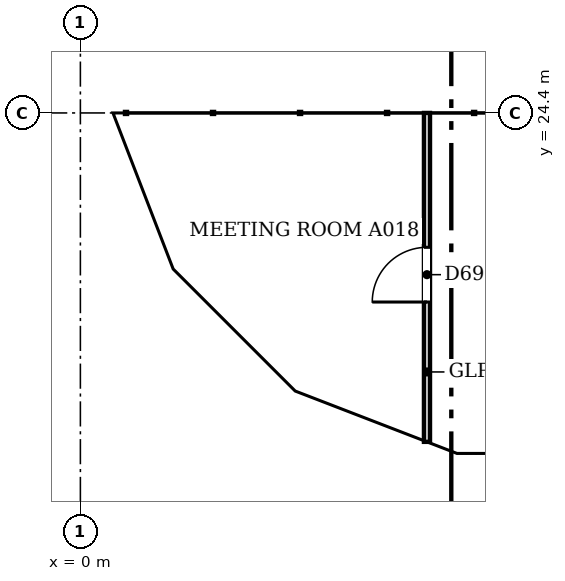
"""IFC4 building model, lengths in metres.
Left out: names, types, materials, properties, quantities, classifications, styles, units other than length and angle.
Written with IfcOpenShell. Run it as: python <this file> out.ifc"""

import sys

from ifc_helpers import new_model, si_unit, direction, frame, frame_2d, origin, place, context, subcontext, project, spatial, polyline, rectangle, outline, extrude, faceted_brep, source, transform, mapped, element, fill, save


model = new_model("IFC4")
c1 = context("Model", 3, precision=1e-05, world=origin(), true_north=direction((0.0, 1.0)))
c2 = subcontext(c1, "Body", "Model", "MODEL_VIEW")
j1 = project(units=[si_unit("LENGTHUNIT", "METRE"), si_unit("PLANEANGLEUNIT", "RADIAN")], contexts=[c1])
p1 = place(None, origin())
s1 = spatial("IfcSite", under=j1, at=p1, CompositionType="ELEMENT")
p2 = place(p1, origin())
s2 = spatial("IfcBuilding", under=s1, at=p2, CompositionType="ELEMENT")
p3 = place(p2, frame((0.0, 0.0, 37.2)))
s3 = spatial("IfcBuildingStorey", under=s2, at=p3, CompositionType="ELEMENT", Elevation=37.2)
m1 = source(origin(), c2, "Body", "Brep", [
    faceted_brep([(3.003, -0.25, 0.0), (3.05, -0.25, 0.06), (3.05, -0.25, 7.54), (3.003, -0.25, 7.6), (0.0, -0.25, 3.8), (0.0, 0.25, 3.8), (2.957, 0.25, 7.541), (2.957, 0.25, 0.059), (3.003, 0.0, 0.0), (3.003, 0.0, 7.6)], [[[0, 1, 2, 3, 4]], [[5, 6, 7]], [[1, 0, 8]], [[9, 3, 2]], [[6, 5, 4, 3, 9]], [[5, 7, 8, 0, 4]], [[1, 8, 7, 6, 9, 2]]]),
])
p4 = place(p3, frame((0.25, 27.45, -3.8), z_axis=(0.0, 0.0, 1.0), x_axis=(0.0, -1.0, 0.0)))
e1 = element("IfcWall", 1, at=p4, inside=s3, PredefinedType="SOLIDWALL", context=c2, shape_type="MappedRepresentation", body=[
    mapped(m1, transform((0.0, 0.0, 0.0), scale=1.0)),
])
m2 = source(origin(), c2, "Body", "SweptSolid", [
    extrude(outline(polyline([(2.803, 6.944), (0.319, 3.8), (2.803, 0.656), (2.803, 6.944)])), frame((0.0, 0.26, 0.0), z_axis=(0.0, -1.0, 0.0), x_axis=(1.0, 0.0, 0.0)), (0.0, 0.0, 1.0), 0.52),
])
p5 = place(p4, origin())
e2 = element("IfcOpeningElement", 2, at=p5, cuts=e1, PredefinedType="OPENING", context=c2, shape_type="MappedRepresentation", body=[
    mapped(m2, transform((0.0, 0.0, 0.0), scale=1.0)),
])
m3 = source(origin(), c2, "Body", "Brep", [
    faceted_brep([(0.047, -0.25, 0.0), (2.997, -0.25, 3.8), (0.047, -0.25, 7.6), (0.0, -0.25, 7.541), (0.0, -0.25, 0.059), (0.093, 0.25, 7.54), (2.944, 0.25, 3.868), (2.944, 0.25, 3.732), (0.093, 0.25, 0.06), (2.997, 0.0, 3.8), (0.047, 0.0, 0.0), (0.047, 0.0, 7.6)], [[[0, 1, 2, 3, 4]], [[5, 6, 7, 8]], [[8, 7, 9, 1, 0, 10]], [[6, 5, 11, 2, 1, 9]], [[3, 2, 11]], [[10, 0, 4]], [[8, 10, 4, 3, 11, 5]], [[9, 7, 6]]]),
])
p6 = place(p3, frame((0.233, 24.49, -3.8), z_axis=(0.0, 0.0, 1.0), x_axis=(0.359901446078, -0.932990326376, 0.0)))
e3 = element("IfcWall", 3, at=p6, inside=s3, PredefinedType="SOLIDWALL", context=c2, shape_type="MappedRepresentation", body=[
    mapped(m3, transform((0.0, 0.0, 0.0), scale=1.0)),
])
m4 = source(origin(), c2, "Body", "SweptSolid", [
    extrude(outline(polyline([(0.247, 0.665), (2.681, 3.8), (0.247, 6.935), (0.247, 0.665)])), frame((0.0, 0.26, 0.0), z_axis=(0.0, -1.0, 0.0), x_axis=(1.0, 0.0, 0.0)), (0.0, 0.0, 1.0), 0.52),
])
p7 = place(p6, origin())
e4 = element("IfcOpeningElement", 4, at=p7, cuts=e3, PredefinedType="OPENING", context=c2, shape_type="MappedRepresentation", body=[
    mapped(m4, transform((0.0, 0.0, 0.0), scale=1.0)),
])
m5 = source(origin(), c2, "Body", "Brep", [
    faceted_brep([(2.944, -0.25, 0.0), (2.997, -0.25, 0.068), (2.997, -0.25, 7.532), (2.944, -0.25, 7.6), (0.0, -0.25, 3.8), (0.053, 0.25, 3.868), (2.891, 0.25, 7.532), (2.891, 0.25, 0.068), (0.053, 0.25, 3.732), (2.944, 0.0, 0.0), (2.944, 0.0, 7.6), (0.0, 0.0, 3.8)], [[[0, 1, 2, 3, 4]], [[5, 6, 7, 8]], [[1, 0, 9]], [[10, 3, 2]], [[6, 5, 11, 4, 3, 10]], [[8, 7, 9, 0, 4, 11]], [[8, 11, 5]], [[1, 9, 7, 6, 10, 2]]]),
])
p8 = place(p3, frame((1.312, 21.694, -3.8), z_axis=(0.0, 0.0, 1.0), x_axis=(0.707066050402, -0.707147509625, 0.0)))
e5 = element("IfcWall", 5, at=p8, inside=s3, PredefinedType="SOLIDWALL", context=c2, shape_type="MappedRepresentation", body=[
    mapped(m5, transform((0.0, 0.0, 0.0), scale=1.0)),
])
m6 = source(origin(), c2, "Body", "SweptSolid", [
    extrude(outline(polyline([(2.744, 6.934), (0.316, 3.8), (2.744, 0.667), (2.744, 6.934)])), frame((0.0, 0.26, 0.0), z_axis=(0.0, -1.0, 0.0), x_axis=(1.0, 0.0, 0.0)), (0.0, 0.0, 1.0), 0.52),
])
p9 = place(p8, origin())
e6 = element("IfcOpeningElement", 6, at=p9, cuts=e5, PredefinedType="OPENING", context=c2, shape_type="MappedRepresentation", body=[
    mapped(m6, transform((0.0, 0.0, 0.0), scale=1.0)),
])
m7 = source(origin(), c2, "Body", "Brep", [
    faceted_brep([(0.053, -0.25, 0.0), (3.003, -0.25, 3.8), (0.053, -0.25, 7.6), (0.0, -0.25, 7.532), (0.0, -0.25, 0.068), (0.106, 0.25, 7.532), (2.957, 0.25, 3.86), (2.957, 0.25, 3.74), (0.106, 0.25, 0.068), (3.003, 0.0, 3.8), (0.053, 0.0, 0.0), (0.053, 0.0, 7.6)], [[[0, 1, 2, 3, 4]], [[5, 6, 7, 8]], [[8, 7, 9, 1, 0, 10]], [[6, 5, 11, 2, 1, 9]], [[3, 2, 11]], [[10, 0, 4]], [[8, 10, 4, 3, 11, 5]], [[9, 7, 6]]]),
])
p10 = place(p3, frame((3.344, 19.631, -3.8), z_axis=(0.0, 0.0, 1.0), x_axis=(0.933007896601, -0.359855894603, 0.0)))
e7 = element("IfcWall", 7, at=p10, inside=s3, PredefinedType="SOLIDWALL", context=c2, shape_type="MappedRepresentation", body=[
    mapped(m7, transform((0.0, 0.0, 0.0), scale=1.0)),
])
m8 = source(origin(), c2, "Body", "SweptSolid", [
    extrude(outline(polyline([(0.253, 0.665), (2.687, 3.8), (0.253, 6.935), (0.253, 0.665)])), frame((0.0, 0.26, 0.0), z_axis=(0.0, -1.0, 0.0), x_axis=(1.0, 0.0, 0.0)), (0.0, 0.0, 1.0), 0.52),
])
p11 = place(p10, origin())
e8 = element("IfcOpeningElement", 8, at=p11, cuts=e7, PredefinedType="OPENING", context=c2, shape_type="MappedRepresentation", body=[
    mapped(m8, transform((0.0, 0.0, 0.0), scale=1.0)),
])
m9 = source(origin(), c2, "Body", "Brep", [
    faceted_brep([(3.003, -0.25, 0.0), (6.053, -0.25, 3.8), (3.003, -0.25, 7.6), (0.0, -0.25, 3.8), (0.047, 0.25, 3.859), (3.003, 0.25, 7.6), (6.053, 0.25, 3.8), (3.003, 0.25, 0.0), (0.047, 0.25, 3.741), (0.0, 0.0, 3.8)], [[[0, 1, 2, 3]], [[4, 5, 6, 7, 8]], [[7, 6, 1, 0]], [[6, 5, 2, 1]], [[5, 4, 9, 3, 2]], [[8, 7, 0, 3, 9]], [[8, 9, 4]]]),
])
p12 = place(p3, frame((6.146, 18.55, -3.8), z_axis=(0.0, 0.0, 1.0), x_axis=(1.0, 0.0, 0.0)))
e9 = element("IfcWall", 9, at=p12, inside=s3, PredefinedType="SOLIDWALL", context=c2, shape_type="MappedRepresentation", body=[
    mapped(m9, transform((0.0, 0.0, 0.0), scale=1.0)),
])
m10 = source(origin(), c2, "Body", "SweptSolid", [
    extrude(outline(polyline([(3.005, 0.401), (5.733, 3.8), (3.005, 7.199), (0.319, 3.8), (3.005, 0.401)])), frame((0.0, 0.26, 0.0), z_axis=(0.0, -1.0, 0.0), x_axis=(1.0, 0.0, 0.0)), (0.0, 0.0, 1.0), 0.52),
])
p13 = place(p12, origin())
e10 = element("IfcOpeningElement", 10, at=p13, cuts=e9, PredefinedType="OPENING", context=c2, shape_type="MappedRepresentation", body=[
    mapped(m10, transform((0.0, 0.0, 0.0), scale=1.0)),
])
p14 = place(p2, frame((0.0, 0.0, 41.0)))
s4 = spatial("IfcBuildingStorey", under=s2, at=p14, CompositionType="ELEMENT", Elevation=41.0)
m11 = source(origin(), c2, "Body", "Brep", [
    faceted_brep([(3.05, -0.25, 0.0), (6.053, -0.25, 3.8), (3.05, -0.25, 7.6), (0.0, -0.25, 3.8), (0.0, 0.25, 3.8), (3.05, 0.25, 7.6), (6.007, 0.25, 3.859), (6.007, 0.25, 3.741), (3.05, 0.25, 0.0), (6.053, 0.0, 3.8)], [[[0, 1, 2, 3]], [[4, 5, 6, 7, 8]], [[8, 7, 9, 1, 0]], [[6, 5, 2, 1, 9]], [[5, 4, 3, 2]], [[4, 8, 0, 3]], [[9, 7, 6]]]),
])
p15 = place(p14, frame((0.25, 30.5, -3.8), z_axis=(0.0, 0.0, 1.0), x_axis=(0.0, -1.0, 0.0)))
e11 = element("IfcWall", 11, at=p15, inside=s4, PredefinedType="SOLIDWALL", context=c2, shape_type="MappedRepresentation", body=[
    mapped(m11, transform((0.0, 0.0, 0.0), scale=1.0)),
])
m12 = source(origin(), c2, "Body", "SweptSolid", [
    extrude(outline(polyline([(3.049, 0.401), (5.735, 3.8), (3.049, 7.199), (0.321, 3.8), (3.049, 0.401)])), frame((0.0, 0.26, 0.0), z_axis=(0.0, -1.0, 0.0), x_axis=(1.0, 0.0, 0.0)), (0.0, 0.0, 1.0), 0.52),
])
p16 = place(p15, origin())
e12 = element("IfcOpeningElement", 12, at=p16, cuts=e11, PredefinedType="OPENING", context=c2, shape_type="MappedRepresentation", body=[
    mapped(m12, transform((0.0, 0.0, 0.0), scale=1.0)),
])
m13 = source(origin(), c2, "Body", "Brep", [
    faceted_brep([(2.95, -0.25, 0.0), (3.003, -0.25, 0.068), (3.003, -0.25, 7.532), (2.95, -0.25, 7.6), (0.0, -0.25, 3.8), (0.047, 0.25, 3.86), (2.898, 0.25, 7.532), (2.898, 0.25, 0.068), (0.047, 0.25, 3.74), (2.95, 0.0, 0.0), (2.95, 0.0, 7.6), (0.0, 0.0, 3.8)], [[[0, 1, 2, 3, 4]], [[5, 6, 7, 8]], [[1, 0, 9]], [[10, 3, 2]], [[6, 5, 11, 4, 3, 10]], [[8, 7, 9, 0, 4, 11]], [[8, 11, 5]], [[1, 9, 7, 6, 10, 2]]]),
])
p17 = place(p14, frame((0.25, 24.447, -3.8), z_axis=(0.0, 0.0, 1.0), x_axis=(0.35992665181, -0.932980602862, 0.0)))
e13 = element("IfcWall", 13, at=p17, inside=s4, PredefinedType="SOLIDWALL", context=c2, shape_type="MappedRepresentation", body=[
    mapped(m13, transform((0.0, 0.0, 0.0), scale=1.0)),
])
m14 = source(origin(), c2, "Body", "SweptSolid", [
    extrude(outline(polyline([(2.75, 6.935), (0.316, 3.8), (2.75, 0.665), (2.75, 6.935)])), frame((0.0, 0.26, 0.0), z_axis=(0.0, -1.0, 0.0), x_axis=(1.0, 0.0, 0.0)), (0.0, 0.0, 1.0), 0.52),
])
p18 = place(p17, origin())
e14 = element("IfcOpeningElement", 14, at=p18, cuts=e13, PredefinedType="OPENING", context=c2, shape_type="MappedRepresentation", body=[
    mapped(m14, transform((0.0, 0.0, 0.0), scale=1.0)),
])
m15 = source(origin(), c2, "Body", "Brep", [
    faceted_brep([(0.053, -0.25, 0.0), (2.997, -0.25, 3.8), (0.053, -0.25, 7.6), (0.0, -0.25, 7.532), (0.0, -0.25, 0.068), (0.106, 0.25, 7.532), (2.944, 0.25, 3.868), (2.944, 0.25, 3.732), (0.106, 0.25, 0.068), (2.997, 0.0, 3.8), (0.053, 0.0, 0.0), (0.053, 0.0, 7.6)], [[[0, 1, 2, 3, 4]], [[5, 6, 7, 8]], [[8, 7, 9, 1, 0, 10]], [[6, 5, 11, 2, 1, 9]], [[3, 2, 11]], [[10, 0, 4]], [[8, 10, 4, 3, 11, 5]], [[9, 7, 6]]]),
])
p19 = place(p14, frame((1.274, 21.731, -3.8), z_axis=(0.0, 0.0, 1.0), x_axis=(0.707147509625, -0.707066050402, 0.0)))
e15 = element("IfcWall", 15, at=p19, inside=s4, PredefinedType="SOLIDWALL", context=c2, shape_type="MappedRepresentation", body=[
    mapped(m15, transform((0.0, 0.0, 0.0), scale=1.0)),
])
m16 = source(origin(), c2, "Body", "SweptSolid", [
    extrude(outline(polyline([(0.253, 0.666), (2.681, 3.8), (0.253, 6.934), (0.253, 0.666)])), frame((0.0, 0.26, 0.0), z_axis=(0.0, -1.0, 0.0), x_axis=(1.0, 0.0, 0.0)), (0.0, 0.0, 1.0), 0.52),
])
p20 = place(p19, origin())
e16 = element("IfcOpeningElement", 16, at=p20, cuts=e15, PredefinedType="OPENING", context=c2, shape_type="MappedRepresentation", body=[
    mapped(m16, transform((0.0, 0.0, 0.0), scale=1.0)),
])
m17 = source(origin(), c2, "Body", "Brep", [
    faceted_brep([(2.95, -0.25, 0.0), (2.997, -0.25, 0.059), (2.997, -0.25, 7.541), (2.95, -0.25, 7.6), (0.0, -0.25, 3.8), (0.053, 0.25, 3.868), (2.904, 0.25, 7.54), (2.904, 0.25, 0.06), (0.053, 0.25, 3.732), (2.95, 0.0, 0.0), (2.95, 0.0, 7.6), (0.0, 0.0, 3.8)], [[[0, 1, 2, 3, 4]], [[5, 6, 7, 8]], [[1, 0, 9]], [[10, 3, 2]], [[6, 5, 11, 4, 3, 10]], [[8, 7, 9, 0, 4, 11]], [[8, 11, 5]], [[1, 9, 7, 6, 10, 2]]]),
])
p21 = place(p14, frame((3.394, 19.612, -3.8), z_axis=(0.0, 0.0, 1.0), x_axis=(0.932990326376, -0.359901446078, 0.0)))
e17 = element("IfcWall", 17, at=p21, inside=s4, PredefinedType="SOLIDWALL", context=c2, shape_type="MappedRepresentation", body=[
    mapped(m17, transform((0.0, 0.0, 0.0), scale=1.0)),
])
p22 = place(p21, origin())
e18 = element("IfcOpeningElement", 18, at=p22, cuts=e17, PredefinedType="OPENING", context=c2, shape_type="MappedRepresentation", body=[
    mapped(m14, transform((0.0, 0.0, 0.0), scale=1.0)),
])
m18 = source(origin(), c2, "Body", "Brep", [
    faceted_brep([(0.047, -0.25, 0.0), (3.05, -0.25, 3.8), (0.047, -0.25, 7.6), (0.0, -0.25, 7.54), (0.0, -0.25, 0.06), (0.093, 0.25, 7.541), (3.05, 0.25, 3.8), (0.093, 0.25, 0.059), (0.047, 0.0, 0.0), (0.047, 0.0, 7.6)], [[[0, 1, 2, 3, 4]], [[5, 6, 7]], [[7, 6, 1, 0, 8]], [[6, 5, 9, 2, 1]], [[3, 2, 9]], [[8, 0, 4]], [[7, 8, 4, 3, 9, 5]]]),
])
p23 = place(p14, frame((6.1, 18.55, -3.8), z_axis=(0.0, 0.0, 1.0), x_axis=(1.0, 0.0, 0.0)))
e19 = element("IfcWall", 19, at=p23, inside=s4, PredefinedType="SOLIDWALL", context=c2, shape_type="MappedRepresentation", body=[
    mapped(m18, transform((0.0, 0.0, 0.0), scale=1.0)),
])
m19 = source(origin(), c2, "Body", "SweptSolid", [
    extrude(outline(polyline([(0.247, 0.656), (2.731, 3.8), (0.247, 6.944), (0.247, 0.656)])), frame((0.0, 0.26, 0.0), z_axis=(0.0, -1.0, 0.0), x_axis=(1.0, 0.0, 0.0)), (0.0, 0.0, 1.0), 0.52),
])
p24 = place(p23, origin())
e20 = element("IfcOpeningElement", 20, at=p24, cuts=e19, PredefinedType="OPENING", context=c2, shape_type="MappedRepresentation", body=[
    mapped(m19, transform((0.0, 0.0, 0.0), scale=1.0)),
])
p25 = place(p3, frame((5.7, 18.99, 0.0), z_axis=(0.0, 0.0, 1.0), x_axis=(0.0, 1.0, 0.0)))
e21 = element("IfcWall", 21, at=p25, inside=s3, PredefinedType="PARTITIONING", context=c2, shape_type="SweptSolid", body=[
    extrude(rectangle(XDim=5.41, YDim=0.1, at=frame_2d((2.705, 0.0))), origin(), (0.0, 0.0, 1.0), 3.067),
])
m20 = source(origin(), c2, "Body", "SweptSolid", [
    extrude(rectangle(XDim=0.9, YDim=2.1, at=frame_2d((0.45, 1.05))), frame((0.0, 0.06, 0.0), z_axis=(0.0, -1.0, 0.0), x_axis=(1.0, 0.0, 0.0)), (0.0, 0.0, 1.0), 0.12),
])
p26 = place(p25, frame((2.3, 0.0, 0.0)))
e22 = element("IfcOpeningElement", 22, at=p26, cuts=e21, PredefinedType="OPENING", context=c2, shape_type="MappedRepresentation", body=[
    mapped(m20, transform((0.0, 0.0, 0.0), scale=1.0)),
])
m21 = source(origin(), c2, "Body", "SweptSolid", [
    extrude(rectangle(XDim=0.9, YDim=2.1, at=frame_2d((0.45, 1.05))), frame((0.0, 0.025, 0.0), z_axis=(0.0, -1.0, 0.0), x_axis=(1.0, 0.0, 0.0)), (0.0, 0.0, 1.0), 0.05),
])
p27 = place(p26, origin())
e23 = element("IfcDoor", 23, at=p27, inside=s3, OperationType="SINGLE_SWING_LEFT", PredefinedType="DOOR", context=c2, shape_type="MappedRepresentation", body=[
    mapped(m21, transform((0.0, 0.0, 0.0), scale=1.0)),
])
fill(e22, e23)
save(model, sys.argv[1])
